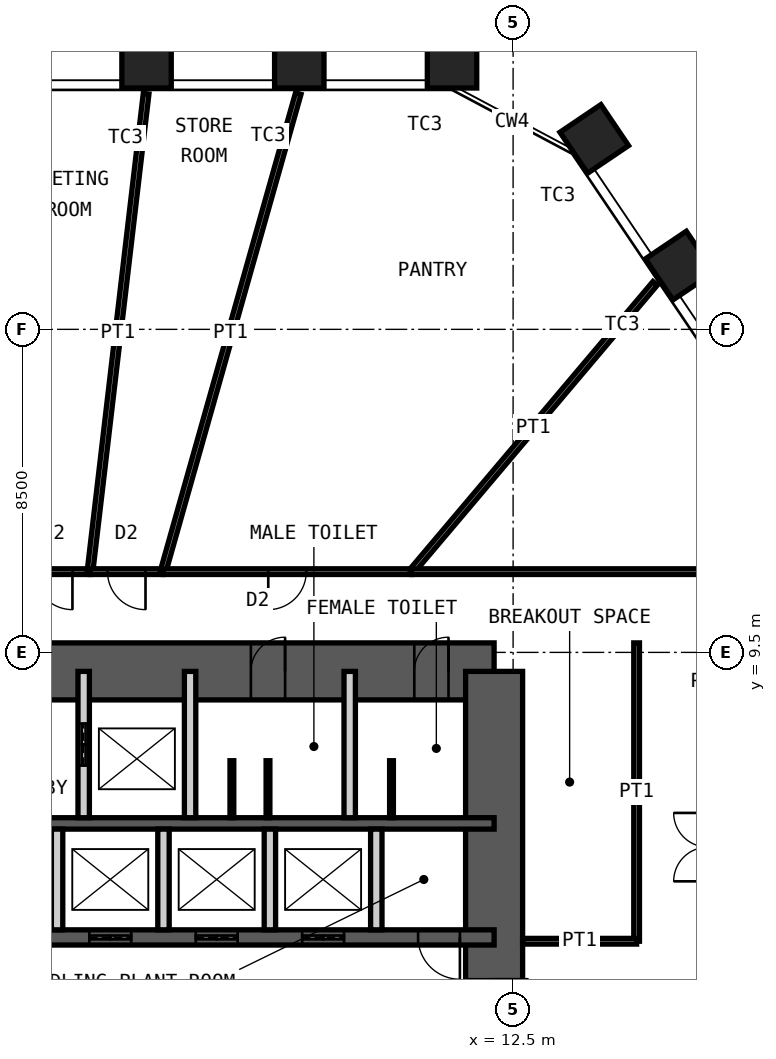
"""IFC4 building model, lengths in metres.
Left out: names, types, materials, properties, quantities, classifications, styles, units other than length and angle.
Written with IfcOpenShell. Run it as: python <this file> out.ifc"""

import sys

from ifc_helpers import new_model, si_unit, direction, frame, frame_2d, origin, origin_2d, place, context, subcontext, project, spatial, rectangle, hollow_rectangle, extrude, element, fill, save


model = new_model("IFC4")
c1 = context("Model", 3, precision=1e-05, world=origin(), true_north=direction((0.0, 1.0)))
c2 = subcontext(c1, "Body", "Model", "MODEL_VIEW")
j1 = project(units=[si_unit("LENGTHUNIT", "METRE"), si_unit("PLANEANGLEUNIT", "RADIAN")], contexts=[c1])
p1 = place(None, origin())
s1 = spatial("IfcSite", under=j1, at=p1, CompositionType="ELEMENT")
p2 = place(p1, origin())
s2 = spatial("IfcBuilding", under=s1, at=p2, CompositionType="ELEMENT")
p3 = place(p2, frame((0.0, 0.0, 111.4)))
s3 = spatial("IfcBuildingStorey", under=s2, at=p3, CompositionType="ELEMENT", Elevation=111.4)
for number, where, z_axis, x_axis in (
    (1, (2.854, 25.0, 0.0), (0.0, 0.0, 1.0), (-1.0, 0.0, 0.0)),
    (2, (6.874, 25.0, 0.0), (0.0, 0.0, 1.0), (-1.0, 0.0, 0.0)),
    (3, (10.893, 25.0, 0.0), (0.0, 0.0, 1.0), (-1.0, 0.0, 0.0)),
    (4, (14.635, 23.01, 0.0), (0.0, 0.0, 1.0), (-0.559, 0.829, 0.0)),
    (5, (16.882, 19.678, 0.0), (0.0, 0.0, 1.0), (-0.559, 0.829, 0.0)),
):
    element("IfcColumn", number, at=place(p3, frame(where, z_axis=z_axis, x_axis=x_axis)), inside=s3, PredefinedType="COLUMN", context=c2, shape_type="SweptSolid", body=[
        extrude(hollow_rectangle(XDim=1.3, YDim=1.3, WallThickness=0.1, at=origin_2d()), origin(), (0.0, 0.0, 1.0), 4.2),
    ])
p4 = place(p3, frame((-12.0, 9.0, 0.0), z_axis=(0.0, 0.0, 1.0), x_axis=(1.0, 0.0, 0.0)))
e6 = element("IfcWall", 6, at=p4, inside=s3, PredefinedType="SHEAR", context=c2, shape_type="SweptSolid", body=[
    extrude(rectangle(XDim=24.0, YDim=1.5, at=frame_2d((12.0, 0.0))), origin(), (0.0, 0.0, 1.0), 4.2),
])
p5 = place(p4, frame((10.4, 0.0, 0.0)))
e7 = element("IfcOpeningElement", 7, at=p5, cuts=e6, PredefinedType="OPENING", context=c2, shape_type="SweptSolid", body=[
    extrude(rectangle(XDim=1.0, YDim=2.1, at=frame_2d((0.5, 1.05))), frame((0.0, 0.76, 0.0), z_axis=(0.0, -1.0, 0.0), x_axis=(1.0, 0.0, 0.0)), (0.0, 0.0, 1.0), 1.52),
])
p6 = place(p4, frame((17.6, 0.0, 0.0)))
e8 = element("IfcOpeningElement", 8, at=p6, cuts=e6, PredefinedType="OPENING", context=c2, shape_type="SweptSolid", body=[
    extrude(rectangle(XDim=0.9, YDim=2.1, at=frame_2d((0.45, 1.05))), frame((0.0, 0.76, 0.0), z_axis=(0.0, -1.0, 0.0), x_axis=(1.0, 0.0, 0.0)), (0.0, 0.0, 1.0), 1.52),
])
p7 = place(p4, frame((21.9, 0.0, 0.0)))
e9 = element("IfcOpeningElement", 9, at=p7, cuts=e6, PredefinedType="OPENING", context=c2, shape_type="SweptSolid", body=[
    extrude(rectangle(XDim=0.9, YDim=2.1, at=frame_2d((0.45, 1.05))), frame((0.0, 0.76, 0.0), z_axis=(0.0, -1.0, 0.0), x_axis=(1.0, 0.0, 0.0)), (0.0, 0.0, 1.0), 1.52),
])
p8 = place(p3, frame((12.0, -9.0, 0.0), z_axis=(0.0, 0.0, 1.0), x_axis=(0.0, 1.0, 0.0)))
e10 = element("IfcWall", 10, at=p8, inside=s3, PredefinedType="SHEAR", context=c2, shape_type="SweptSolid", body=[
    extrude(rectangle(XDim=18.0, YDim=1.5, at=frame_2d((9.0, 0.0))), origin(), (0.0, 0.0, 1.0), 4.2),
])
p9 = place(p8, frame((8.1, 0.0, 0.0)))
e11 = element("IfcOpeningElement", 11, at=p9, cuts=e10, PredefinedType="OPENING", context=c2, shape_type="SweptSolid", body=[
    extrude(rectangle(XDim=1.8, YDim=2.1, at=frame_2d((0.9, 1.05))), frame((0.0, 0.76, 0.0), z_axis=(0.0, -1.0, 0.0), x_axis=(1.0, 0.0, 0.0)), (0.0, 0.0, 1.0), 1.52),
])
p10 = place(p3, frame((-12.0, 5.0, 0.0), z_axis=(0.0, 0.0, 1.0), x_axis=(1.0, 0.0, 0.0)))
e12 = element("IfcWall", 12, at=p10, inside=s3, PredefinedType="SHEAR", context=c2, shape_type="SweptSolid", body=[
    extrude(rectangle(XDim=24.0, YDim=0.3, at=frame_2d((12.0, 0.0))), origin(), (0.0, 0.0, 1.0), 4.2),
])
p11 = place(p3, frame((-12.0, 2.0, 0.0), z_axis=(0.0, 0.0, 1.0), x_axis=(1.0, 0.0, 0.0)))
e13 = element("IfcWall", 13, at=p11, inside=s3, PredefinedType="SHEAR", context=c2, shape_type="SweptSolid", body=[
    extrude(rectangle(XDim=24.0, YDim=0.4, at=frame_2d((12.0, 0.0))), origin(), (0.0, 0.0, 1.0), 4.2),
])
p12 = place(p11, frame((2.4, 0.0, 0.0)))
e14 = element("IfcOpeningElement", 14, at=p12, cuts=e13, PredefinedType="OPENING", context=c2, shape_type="SweptSolid", body=[
    extrude(rectangle(XDim=1.1, YDim=2.1, at=frame_2d((0.55, 1.05))), frame((0.0, 0.21, 0.0), z_axis=(0.0, -1.0, 0.0), x_axis=(1.0, 0.0, 0.0)), (0.0, 0.0, 1.0), 0.42),
])
p13 = place(p11, frame((22.0, 0.0, 0.0)))
e15 = element("IfcOpeningElement", 15, at=p13, cuts=e13, PredefinedType="OPENING", context=c2, shape_type="SweptSolid", body=[
    extrude(rectangle(XDim=1.1, YDim=2.1, at=frame_2d((0.55, 1.05))), frame((0.0, 0.21, 0.0), z_axis=(0.0, -1.0, 0.0), x_axis=(1.0, 0.0, 0.0)), (0.0, 0.0, 1.0), 0.42),
])
p14 = place(p11, frame((10.15, 0.0, 0.0)))
e16 = element("IfcOpeningElement", 16, at=p14, cuts=e13, PredefinedType="OPENING", context=c2, shape_type="SweptSolid", body=[
    extrude(rectangle(XDim=1.0, YDim=2.1, at=frame_2d((0.5, 1.05))), frame((0.0, 0.21, 0.0), z_axis=(0.0, -1.0, 0.0), x_axis=(1.0, 0.0, 0.0)), (0.0, 0.0, 1.0), 0.42),
])
p15 = place(p11, frame((6.9, 0.0, 0.0)))
e17 = element("IfcOpeningElement", 17, at=p15, cuts=e13, PredefinedType="OPENING", context=c2, shape_type="SweptSolid", body=[
    extrude(rectangle(XDim=1.0, YDim=2.1, at=frame_2d((0.5, 1.05))), frame((0.0, 0.21, 0.0), z_axis=(0.0, -1.0, 0.0), x_axis=(1.0, 0.0, 0.0)), (0.0, 0.0, 1.0), 0.42),
])
p16 = place(p11, frame((13.35, 0.0, 0.0)))
e18 = element("IfcOpeningElement", 18, at=p16, cuts=e13, PredefinedType="OPENING", context=c2, shape_type="SweptSolid", body=[
    extrude(rectangle(XDim=1.1, YDim=2.4, at=frame_2d((0.55, 1.2))), frame((0.0, 0.21, 0.0), z_axis=(0.0, -1.0, 0.0), x_axis=(1.0, 0.0, 0.0)), (0.0, 0.0, 1.0), 0.42),
])
p17 = place(p11, frame((16.15, 0.0, 0.0)))
e19 = element("IfcOpeningElement", 19, at=p17, cuts=e13, PredefinedType="OPENING", context=c2, shape_type="SweptSolid", body=[
    extrude(rectangle(XDim=1.1, YDim=2.4, at=frame_2d((0.55, 1.2))), frame((0.0, 0.21, 0.0), z_axis=(0.0, -1.0, 0.0), x_axis=(1.0, 0.0, 0.0)), (0.0, 0.0, 1.0), 0.42),
])
p18 = place(p11, frame((18.95, 0.0, 0.0)))
e20 = element("IfcOpeningElement", 20, at=p18, cuts=e13, PredefinedType="OPENING", context=c2, shape_type="SweptSolid", body=[
    extrude(rectangle(XDim=1.1, YDim=2.4, at=frame_2d((0.55, 1.2))), frame((0.0, 0.21, 0.0), z_axis=(0.0, -1.0, 0.0), x_axis=(1.0, 0.0, 0.0)), (0.0, 0.0, 1.0), 0.42),
])
p19 = place(p3, frame((1.2, 5.15, 0.0), z_axis=(0.0, 0.0, 1.0), x_axis=(0.0, 1.0, 0.0)))
e21 = element("IfcWall", 21, at=p19, inside=s3, PredefinedType="PARTITIONING", context=c2, shape_type="SweptSolid", body=[
    extrude(rectangle(XDim=3.85, YDim=0.3, at=frame_2d((1.925, 0.0))), origin(), (0.0, 0.0, 1.0), 3.98),
])
p20 = place(p19, frame((1.375, 0.0, 0.0)))
e22 = element("IfcOpeningElement", 22, at=p20, cuts=e21, PredefinedType="OPENING", context=c2, shape_type="SweptSolid", body=[
    extrude(rectangle(XDim=1.1, YDim=2.4, at=frame_2d((0.55, 1.2))), frame((0.0, 0.16, 0.0), z_axis=(0.0, -1.0, 0.0), x_axis=(1.0, 0.0, 0.0)), (0.0, 0.0, 1.0), 0.32),
])
for number, where, z_axis, x_axis in (
    (23, (4.0, 5.15, 0.0), (0.0, 0.0, 1.0), (0.0, 1.0, 0.0)),
    (24, (8.2, 5.15, 0.0), (0.0, 0.0, 1.0), (0.0, 1.0, 0.0)),
):
    element("IfcWall", number, at=place(p3, frame(where, z_axis=z_axis, x_axis=x_axis)), inside=s3, PredefinedType="PARTITIONING", context=c2, shape_type="SweptSolid", body=[
        extrude(rectangle(XDim=3.85, YDim=0.3, at=frame_2d((1.925, 0.0))), origin(), (0.0, 0.0, 1.0), 3.98),
    ])
for number, where, z_axis, x_axis in (
    (25, (0.5, 2.2, 0.0), (0.0, 0.0, 1.0), (0.0, 1.0, 0.0)),
    (26, (3.3, 2.2, 0.0), (0.0, 0.0, 1.0), (0.0, 1.0, 0.0)),
    (27, (6.1, 2.2, 0.0), (0.0, 0.0, 1.0), (0.0, 1.0, 0.0)),
    (28, (8.9, 2.2, 0.0), (0.0, 0.0, 1.0), (0.0, 1.0, 0.0)),
):
    element("IfcWall", number, at=place(p3, frame(where, z_axis=z_axis, x_axis=x_axis)), inside=s3, PredefinedType="PARTITIONING", context=c2, shape_type="SweptSolid", body=[
        extrude(rectangle(XDim=2.65, YDim=0.3, at=frame_2d((1.325, 0.0))), origin(), (0.0, 0.0, 1.0), 3.98),
    ])
for number, where, z_axis, x_axis in (
    (29, (5.1, 5.15, 0.0), (0.0, 0.0, 1.0), (0.0, 1.0, 0.0)),
    (30, (6.05, 5.15, 0.0), (0.0, 0.0, 1.0), (0.0, 1.0, 0.0)),
    (31, (9.3, 5.15, 0.0), (0.0, 0.0, 1.0), (0.0, 1.0, 0.0)),
):
    element("IfcWall", number, at=place(p3, frame(where, z_axis=z_axis, x_axis=x_axis)), inside=s3, PredefinedType="PARTITIONING", context=c2, shape_type="SweptSolid", body=[
        extrude(rectangle(XDim=1.5, YDim=0.1, at=frame_2d((0.75, 0.0))), origin(), (0.0, 0.0, 1.0), 2.1),
    ])
p21 = place(p3, frame((-0.557, 11.625, 0.0), z_axis=(0.0, 0.0, 1.0), x_axis=(1.0, 0.0, 0.0)))
e32 = element("IfcWall", 32, at=p21, inside=s3, PredefinedType="PARTITIONING", context=c2, shape_type="SweptSolid", body=[
    extrude(rectangle(XDim=1.923, YDim=0.15, at=frame_2d((0.961, 0.0))), origin(), (0.0, 0.0, 1.0), 4.03),
])
p22 = place(p21, frame((0.461, 0.0, 0.0)))
e33 = element("IfcOpeningElement", 33, at=p22, cuts=e32, PredefinedType="OPENING", context=c2, shape_type="SweptSolid", body=[
    extrude(rectangle(XDim=1.0, YDim=2.4, at=frame_2d((0.5, 1.2))), frame((0.0, 0.085, 0.0), z_axis=(0.0, -1.0, 0.0), x_axis=(1.0, 0.0, 0.0)), (0.0, 0.0, 1.0), 0.17),
])
p23 = place(p3, frame((2.843, 24.201, 0.0), z_axis=(0.0, 0.0, 1.0), x_axis=(-0.116670084723, -0.993170726175, 0.0)))
e34 = element("IfcWall", 34, at=p23, inside=s3, PredefinedType="PARTITIONING", context=c2, shape_type="SweptSolid", body=[
    extrude(rectangle(XDim=12.662, YDim=0.15, at=frame_2d((6.331, 0.0))), origin(), (0.0, 0.0, 1.0), 3.33),
])
p24 = place(p3, frame((1.366, 11.625, 0.0), z_axis=(0.0, 0.0, 1.0), x_axis=(1.0, 0.0, 0.0)))
e35 = element("IfcWall", 35, at=p24, inside=s3, PredefinedType="PARTITIONING", context=c2, shape_type="SweptSolid", body=[
    extrude(rectangle(XDim=1.923, YDim=0.15, at=frame_2d((0.961, 0.0))), origin(), (0.0, 0.0, 1.0), 4.03),
])
p25 = place(p24, frame((0.461, 0.0, 0.0)))
e36 = element("IfcOpeningElement", 36, at=p25, cuts=e35, PredefinedType="OPENING", context=c2, shape_type="SweptSolid", body=[
    extrude(rectangle(XDim=1.0, YDim=2.4, at=frame_2d((0.5, 1.2))), frame((0.0, 0.085, 0.0), z_axis=(0.0, -1.0, 0.0), x_axis=(1.0, 0.0, 0.0)), (0.0, 0.0, 1.0), 0.17),
])
p26 = place(p3, frame((6.846, 24.204, 0.0), z_axis=(0.0, 0.0, 1.0), x_axis=(-0.272184461049, -0.962245093084, 0.0)))
e37 = element("IfcWall", 37, at=p26, inside=s3, PredefinedType="PARTITIONING", context=c2, shape_type="SweptSolid", body=[
    extrude(rectangle(XDim=13.073, YDim=0.15, at=frame_2d((6.536, 0.0))), origin(), (0.0, 0.0, 1.0), 3.33),
])
p27 = place(p3, frame((3.288, 11.625, 0.0), z_axis=(0.0, 0.0, 1.0), x_axis=(1.0, 0.0, 0.0)))
e38 = element("IfcWall", 38, at=p27, inside=s3, PredefinedType="PARTITIONING", context=c2, shape_type="SweptSolid", body=[
    extrude(rectangle(XDim=6.538, YDim=0.15, at=frame_2d((3.269, 0.0))), origin(), (0.0, 0.0, 1.0), 4.03),
])
p28 = place(p27, frame((2.769, 0.0, 0.0)))
e39 = element("IfcOpeningElement", 39, at=p28, cuts=e38, PredefinedType="OPENING", context=c2, shape_type="SweptSolid", body=[
    extrude(rectangle(XDim=1.0, YDim=2.4, at=frame_2d((0.5, 1.2))), frame((0.0, 0.085, 0.0), z_axis=(0.0, -1.0, 0.0), x_axis=(1.0, 0.0, 0.0)), (0.0, 0.0, 1.0), 0.17),
])
p29 = place(p3, frame((16.237, 19.21, 0.0), z_axis=(0.0, 0.0, 1.0), x_axis=(-0.645526723652, -0.763737683404, 0.0)))
e40 = element("IfcWall", 40, at=p29, inside=s3, PredefinedType="PARTITIONING", context=c2, shape_type="SweptSolid", body=[
    extrude(rectangle(XDim=9.932, YDim=0.15, at=frame_2d((4.966, 0.0))), origin(), (0.0, 0.0, 1.0), 3.33),
])
p30 = place(p3, frame((9.826, 11.625, 0.0), z_axis=(0.0, 0.0, 1.0), x_axis=(1.0, 0.0, 0.0)))
e41 = element("IfcWall", 41, at=p30, inside=s3, PredefinedType="PARTITIONING", context=c2, shape_type="SweptSolid", body=[
    extrude(rectangle(XDim=7.799, YDim=0.15, at=frame_2d((3.899, 0.0))), origin(), (0.0, 0.0, 1.0), 4.03),
])
p31 = place(p3, frame((15.75, 1.9, 0.0), z_axis=(0.0, 0.0, 1.0), x_axis=(0.0, 1.0, 0.0)))
e42 = element("IfcWall", 42, at=p31, inside=s3, PredefinedType="PARTITIONING", context=c2, shape_type="SweptSolid", body=[
    extrude(rectangle(XDim=7.85, YDim=0.15, at=frame_2d((3.925, 0.0))), origin(), (0.0, 0.0, 1.0), 4.03),
])
p32 = place(p3, frame((12.75, 1.9, 0.0), z_axis=(0.0, 0.0, 1.0), x_axis=(1.0, 0.0, 0.0)))
e43 = element("IfcWall", 43, at=p32, inside=s3, PredefinedType="PARTITIONING", context=c2, shape_type="SweptSolid", body=[
    extrude(rectangle(XDim=3.0, YDim=0.15, at=frame_2d((1.5, 0.0))), origin(), (0.0, 0.0, 1.0), 2.93),
])
p33 = place(p6, origin())
e44 = element("IfcDoor", 44, at=p33, inside=s3, OperationType="SINGLE_SWING_LEFT", PredefinedType="DOOR", context=c2, shape_type="SweptSolid", body=[
    extrude(rectangle(XDim=0.9, YDim=2.1, at=frame_2d((0.45, 1.05))), frame((0.0, 0.025, 0.0), z_axis=(0.0, -1.0, 0.0), x_axis=(1.0, 0.0, 0.0)), (0.0, 0.0, 1.0), 0.05),
])
fill(e8, e44)
p34 = place(p7, origin())
e45 = element("IfcDoor", 45, at=p34, inside=s3, OperationType="SINGLE_SWING_LEFT", PredefinedType="DOOR", context=c2, shape_type="SweptSolid", body=[
    extrude(rectangle(XDim=0.9, YDim=2.1, at=frame_2d((0.45, 1.05))), frame((0.0, 0.025, 0.0), z_axis=(0.0, -1.0, 0.0), x_axis=(1.0, 0.0, 0.0)), (0.0, 0.0, 1.0), 0.05),
])
fill(e9, e45)
p35 = place(p13, origin())
e46 = element("IfcDoor", 46, at=p35, inside=s3, OperationType="SINGLE_SWING_RIGHT", PredefinedType="DOOR", context=c2, shape_type="SweptSolid", body=[
    extrude(rectangle(XDim=1.1, YDim=2.1, at=frame_2d((0.55, 1.05))), frame((0.0, 0.025, 0.0), z_axis=(0.0, -1.0, 0.0), x_axis=(1.0, 0.0, 0.0)), (0.0, 0.0, 1.0), 0.05),
])
fill(e15, e46)
p36 = place(p9, origin())
e47 = element("IfcDoor", 47, at=p36, inside=s3, OperationType="DOUBLE_DOOR_DOUBLE_SWING", PredefinedType="DOOR", context=c2, shape_type="SweptSolid", body=[
    extrude(rectangle(XDim=1.8, YDim=2.1, at=frame_2d((0.9, 1.05))), frame((0.0, 0.025, 0.0), z_axis=(0.0, -1.0, 0.0), x_axis=(1.0, 0.0, 0.0)), (0.0, 0.0, 1.0), 0.05),
])
fill(e11, e47)
p37 = place(p20, origin())
e48 = element("IfcDoor", 48, at=p37, inside=s3, OperationType="DOUBLE_DOOR_SLIDING", PredefinedType="DOOR", context=c2, shape_type="SweptSolid", body=[
    extrude(rectangle(XDim=1.1, YDim=2.4, at=frame_2d((0.55, 1.2))), frame((0.0, 0.025, 0.0), z_axis=(0.0, -1.0, 0.0), x_axis=(1.0, 0.0, 0.0)), (0.0, 0.0, 1.0), 0.05),
])
fill(e22, e48)
p38 = place(p16, origin())
e49 = element("IfcDoor", 49, at=p38, inside=s3, OperationType="DOUBLE_DOOR_SLIDING", PredefinedType="DOOR", context=c2, shape_type="SweptSolid", body=[
    extrude(rectangle(XDim=1.1, YDim=2.4, at=frame_2d((0.55, 1.2))), frame((0.0, 0.025, 0.0), z_axis=(0.0, -1.0, 0.0), x_axis=(1.0, 0.0, 0.0)), (0.0, 0.0, 1.0), 0.05),
])
fill(e18, e49)
p39 = place(p17, origin())
e50 = element("IfcDoor", 50, at=p39, inside=s3, OperationType="DOUBLE_DOOR_SLIDING", PredefinedType="DOOR", context=c2, shape_type="SweptSolid", body=[
    extrude(rectangle(XDim=1.1, YDim=2.4, at=frame_2d((0.55, 1.2))), frame((0.0, 0.025, 0.0), z_axis=(0.0, -1.0, 0.0), x_axis=(1.0, 0.0, 0.0)), (0.0, 0.0, 1.0), 0.05),
])
fill(e19, e50)
p40 = place(p18, origin())
e51 = element("IfcDoor", 51, at=p40, inside=s3, OperationType="DOUBLE_DOOR_SLIDING", PredefinedType="DOOR", context=c2, shape_type="SweptSolid", body=[
    extrude(rectangle(XDim=1.1, YDim=2.4, at=frame_2d((0.55, 1.2))), frame((0.0, 0.025, 0.0), z_axis=(0.0, -1.0, 0.0), x_axis=(1.0, 0.0, 0.0)), (0.0, 0.0, 1.0), 0.05),
])
fill(e20, e51)
p41 = place(p22, origin())
e52 = element("IfcDoor", 52, at=p41, inside=s3, OperationType="SINGLE_SWING_RIGHT", PredefinedType="DOOR", context=c2, shape_type="SweptSolid", body=[
    extrude(rectangle(XDim=1.0, YDim=2.4, at=frame_2d((0.5, 1.2))), frame((0.0, 0.025, 0.0), z_axis=(0.0, -1.0, 0.0), x_axis=(1.0, 0.0, 0.0)), (0.0, 0.0, 1.0), 0.05),
])
fill(e33, e52)
p42 = place(p25, origin())
e53 = element("IfcDoor", 53, at=p42, inside=s3, OperationType="SINGLE_SWING_RIGHT", PredefinedType="DOOR", context=c2, shape_type="SweptSolid", body=[
    extrude(rectangle(XDim=1.0, YDim=2.4, at=frame_2d((0.5, 1.2))), frame((0.0, 0.025, 0.0), z_axis=(0.0, -1.0, 0.0), x_axis=(1.0, 0.0, 0.0)), (0.0, 0.0, 1.0), 0.05),
])
fill(e36, e53)
p43 = place(p28, origin())
e54 = element("IfcDoor", 54, at=p43, inside=s3, OperationType="SINGLE_SWING_LEFT", PredefinedType="DOOR", context=c2, shape_type="SweptSolid", body=[
    extrude(rectangle(XDim=1.0, YDim=2.4, at=frame_2d((0.5, 1.2))), frame((0.0, 0.025, 0.0), z_axis=(0.0, -1.0, 0.0), x_axis=(1.0, 0.0, 0.0)), (0.0, 0.0, 1.0), 0.05),
])
fill(e39, e54)
save(model, sys.argv[1])
